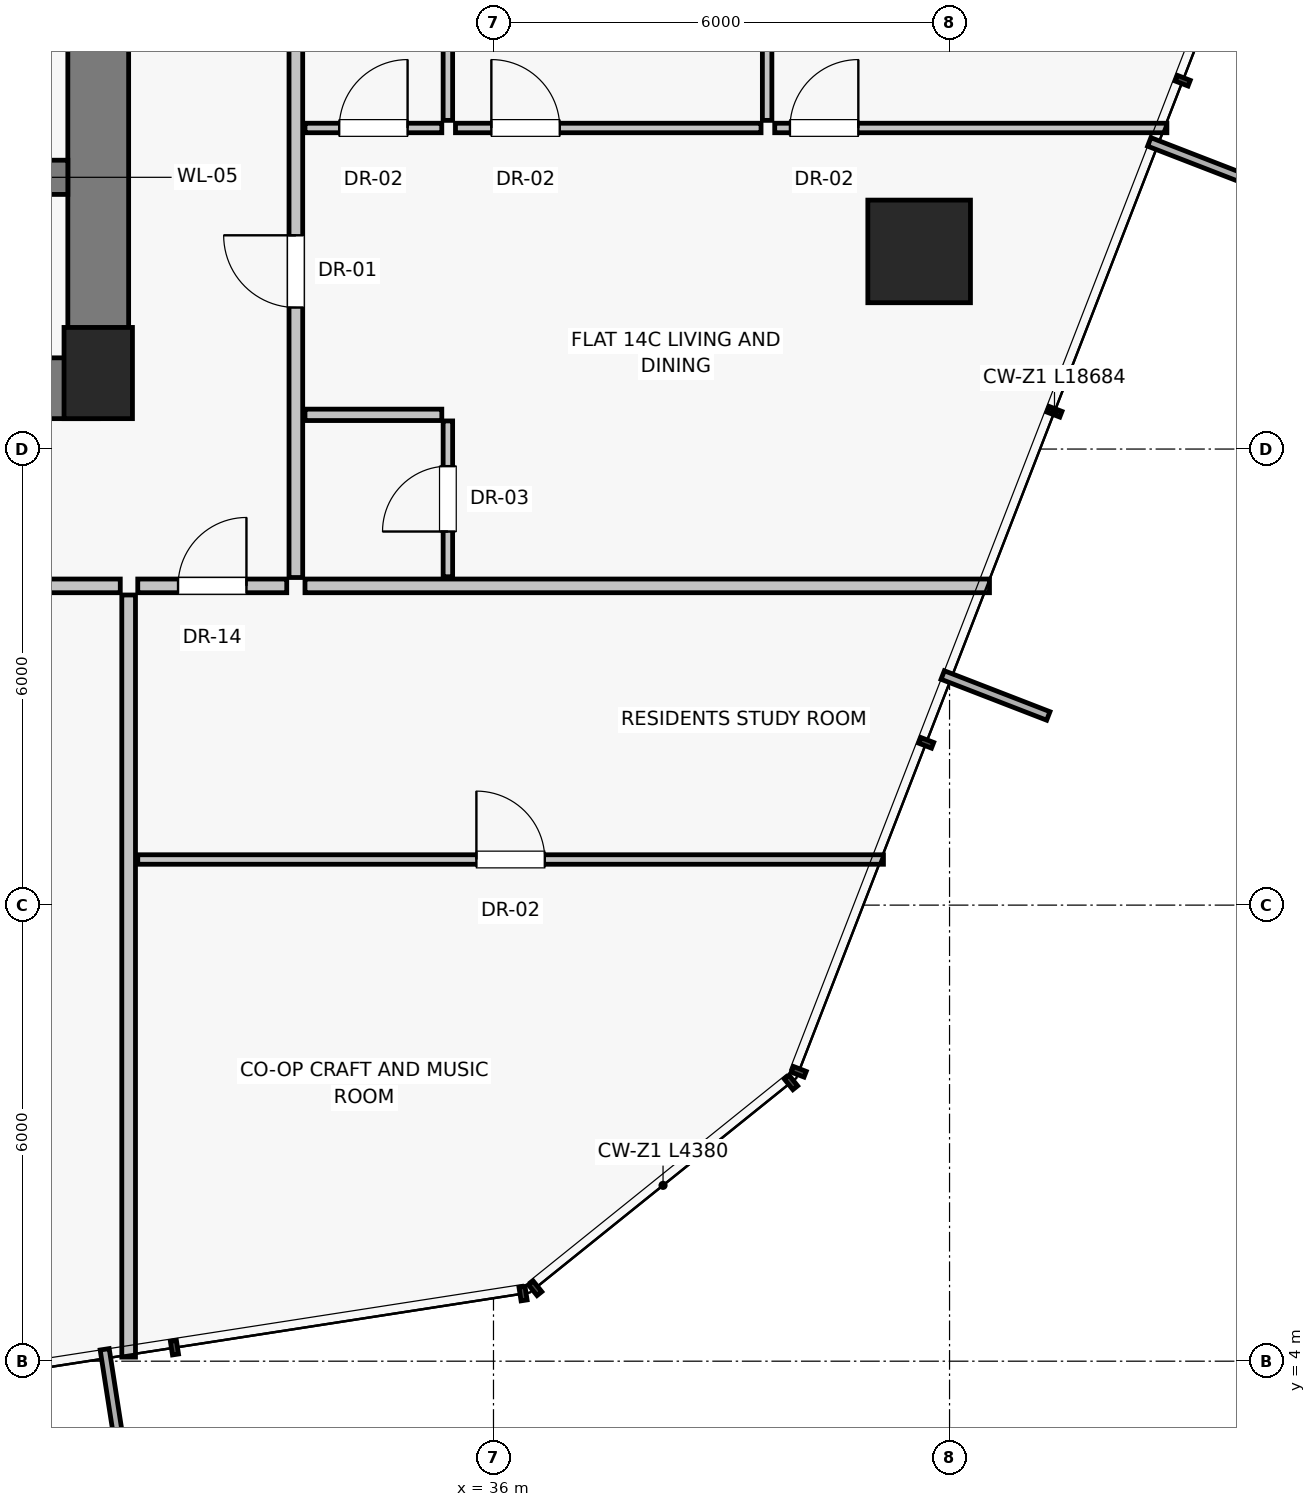
"""IFC4 building model, lengths in metres.
Left out: names, types, materials, properties, quantities, classifications, styles, units other than length and angle.
Written with IfcOpenShell. Run it as: python <this file> out.ifc"""

import sys

from ifc_helpers import new_model, si_unit, direction, frame, frame_2d, origin, origin_2d, place, context, subcontext, project, spatial, rectangle, extrude, source, transform, mapped, element, fill, save


model = new_model("IFC4")
c1 = context("Model", 3, precision=1e-05, world=origin(), true_north=direction((0.0, 1.0)))
c2 = subcontext(c1, "Body", "Model", "MODEL_VIEW")
j1 = project(units=[si_unit("LENGTHUNIT", "METRE"), si_unit("PLANEANGLEUNIT", "RADIAN")], contexts=[c1])
p1 = place(None, origin())
s1 = spatial("IfcSite", under=j1, at=p1, CompositionType="ELEMENT")
p2 = place(p1, origin())
s2 = spatial("IfcBuilding", under=s1, at=p2, CompositionType="ELEMENT")
p3 = place(p2, frame((0.0, 0.0, 53.3)))
s3 = spatial("IfcBuildingStorey", under=s2, at=p3, CompositionType="ELEMENT", Elevation=53.3)
p4 = place(p3, frame((30.8, 17.0, 0.0), z_axis=(0.0, 0.0, 1.0), x_axis=(1.0, 0.0, 0.0)))
e1 = element("IfcColumn", 1, at=p4, inside=s3, PredefinedType="PILASTER", context=c2, shape_type="SweptSolid", body=[
    extrude(rectangle(XDim=0.9, YDim=1.2, at=origin_2d()), origin(), (0.0, 0.0, 1.0), 3.25),
])
p5 = place(p3, frame((41.6, 18.6, 0.0), z_axis=(0.0, 0.0, 1.0), x_axis=(1.0, 0.0, 0.0)))
e2 = element("IfcColumn", 2, at=p5, inside=s3, PredefinedType="COLUMN", context=c2, shape_type="SweptSolid", body=[
    extrude(rectangle(XDim=1.35, YDim=1.35, at=origin_2d()), origin(), (0.0, 0.0, 1.0), 3.25),
])
p6 = place(p3, frame((30.8, 16.8, 0.0), z_axis=(0.0, 0.0, 1.0), x_axis=(0.0, 1.0, 0.0)))
e3 = element("IfcWall", 3, at=p6, inside=s3, PredefinedType="SHEAR", context=c2, shape_type="SweptSolid", body=[
    extrude(rectangle(XDim=14.2, YDim=0.8, at=frame_2d((7.1, 0.0))), origin(), (0.0, 0.0, 1.0), 2.97),
])
p7 = place(p3, frame((24.95, 16.8, 0.0), z_axis=(0.0, 0.0, 1.0), x_axis=(1.0, 0.0, 0.0)))
e4 = element("IfcWall", 4, at=p7, inside=s3, PredefinedType="SHEAR", context=c2, shape_type="SweptSolid", body=[
    extrude(rectangle(XDim=5.85, YDim=0.8, at=frame_2d((2.925, 0.0))), origin(), (0.0, 0.0, 1.0), 2.97),
])
p8 = place(p7, frame((2.15, 0.0, 0.0)))
e5 = element("IfcOpeningElement", 5, at=p8, cuts=e4, PredefinedType="OPENING", context=c2, shape_type="SweptSolid", body=[
    extrude(rectangle(XDim=1.2, YDim=2.03, at=frame_2d((0.6, 1.015))), frame((0.0, 0.41, 0.0), z_axis=(0.0, -1.0, 0.0), x_axis=(1.0, 0.0, 0.0)), (0.0, 0.0, 1.0), 0.82),
])
p9 = place(p3, frame((26.975, 19.575, 0.0), z_axis=(0.0, 0.0, 1.0), x_axis=(1.0, 0.0, 0.0)))
e6 = element("IfcWall", 6, at=p9, inside=s3, PredefinedType="SHEAR", context=c2, shape_type="SweptSolid", body=[
    extrude(rectangle(XDim=3.425, YDim=0.45, at=frame_2d((1.712, 0.0))), origin(), (0.0, 0.0, 1.0), 2.97),
])
p10 = place(p9, frame((1.05, 0.0, 0.0)))
e7 = element("IfcOpeningElement", 7, at=p10, cuts=e6, PredefinedType="OPENING", context=c2, shape_type="SweptSolid", body=[
    extrude(rectangle(XDim=1.1, YDim=2.03, at=frame_2d((0.55, 1.015))), frame((0.0, 0.235, 0.0), z_axis=(0.0, -1.0, 0.0), x_axis=(1.0, 0.0, 0.0)), (0.0, 0.0, 1.0), 0.47),
])
p11 = place(p3, frame((31.2, 14.08, 0.0), z_axis=(0.0, 0.0, 1.0), x_axis=(0.0, -1.0, 0.0)))
e8 = element("IfcWall", 8, at=p11, inside=s3, PredefinedType="PARTITIONING", context=c2, shape_type="SweptSolid", body=[
    extrude(rectangle(XDim=10.027, YDim=0.18, at=frame_2d((5.013, 0.0))), origin(), (0.0, 0.0, 1.0), 2.97),
])
p12 = place(p3, frame((24.368, 14.2, 0.0), z_axis=(0.0, 0.0, 1.0), x_axis=(1.0, 0.0, 0.0)))
e9 = element("IfcWall", 9, at=p12, inside=s3, PredefinedType="PARTITIONING", context=c2, shape_type="SweptSolid", body=[
    extrude(rectangle(XDim=6.722, YDim=0.18, at=frame_2d((3.361, 0.0))), origin(), (0.0, 0.0, 1.0), 2.97),
])
p13 = place(p12, frame((2.861, 0.0, 0.0)))
e10 = element("IfcOpeningElement", 10, at=p13, cuts=e9, PredefinedType="OPENING", context=c2, shape_type="SweptSolid", body=[
    extrude(rectangle(XDim=1.0, YDim=2.01, at=frame_2d((0.5, 1.005))), frame((0.0, 0.1, 0.0), z_axis=(0.0, -1.0, 0.0), x_axis=(1.0, 0.0, 0.0)), (0.0, 0.0, 1.0), 0.2),
])
p14 = place(p3, frame((33.52, 14.2, 0.0), z_axis=(0.0, 0.0, 1.0), x_axis=(1.0, 0.0, 0.0)))
e11 = element("IfcWall", 11, at=p14, inside=s3, PredefinedType="PARTITIONING", context=c2, shape_type="SweptSolid", body=[
    extrude(rectangle(XDim=9.005, YDim=0.18, at=frame_2d((4.503, 0.0))), origin(), (0.0, 0.0, 1.0), 2.97),
])
p15 = place(p3, frame((33.4, 14.31, 0.0), z_axis=(0.0, 0.0, 1.0), x_axis=(0.0, 1.0, 0.0)))
e12 = element("IfcWall", 12, at=p15, inside=s3, PredefinedType="PARTITIONING", context=c2, shape_type="SweptSolid", body=[
    extrude(rectangle(XDim=10.732, YDim=0.18, at=frame_2d((5.366, 0.0))), origin(), (0.0, 0.0, 1.0), 2.97),
])
p16 = place(p15, frame((3.552, 0.0, 0.0)))
e13 = element("IfcOpeningElement", 13, at=p16, cuts=e12, PredefinedType="OPENING", context=c2, shape_type="SweptSolid", body=[
    extrude(rectangle(XDim=0.95, YDim=2.02, at=frame_2d((0.475, 1.01))), frame((0.0, 0.1, 0.0), z_axis=(0.0, -1.0, 0.0), x_axis=(1.0, 0.0, 0.0)), (0.0, 0.0, 1.0), 0.2),
])
p17 = place(p3, frame((33.52, 16.45, 0.0), z_axis=(0.0, 0.0, 1.0), x_axis=(1.0, 0.0, 0.0)))
e14 = element("IfcWall", 14, at=p17, inside=s3, PredefinedType="PARTITIONING", context=c2, shape_type="SweptSolid", body=[
    extrude(rectangle(XDim=1.8, YDim=0.15, at=frame_2d((0.9, 0.0))), origin(), (0.0, 0.0, 1.0), 2.97),
])
p18 = place(p3, frame((35.4, 14.32, 0.0), z_axis=(0.0, 0.0, 1.0), x_axis=(0.0, 1.0, 0.0)))
e15 = element("IfcWall", 15, at=p18, inside=s3, PredefinedType="PARTITIONING", context=c2, shape_type="SweptSolid", body=[
    extrude(rectangle(XDim=2.05, YDim=0.125, at=frame_2d((1.025, 0.0))), origin(), (0.0, 0.0, 1.0), 2.97),
])
p19 = place(p18, frame((0.595, 0.0, 0.0)))
e16 = element("IfcOpeningElement", 16, at=p19, cuts=e15, PredefinedType="OPENING", context=c2, shape_type="SweptSolid", body=[
    extrude(rectangle(XDim=0.86, YDim=2.01, at=frame_2d((0.43, 1.005))), frame((0.0, 0.073, 0.0), z_axis=(0.0, -1.0, 0.0), x_axis=(1.0, 0.0, 0.0)), (0.0, 0.0, 1.0), 0.145),
])
p20 = place(p3, frame((33.52, 20.224, 0.0), z_axis=(0.0, 0.0, 1.0), x_axis=(1.0, 0.0, 0.0)))
e17 = element("IfcWall", 17, at=p20, inside=s3, PredefinedType="PARTITIONING", context=c2, shape_type="SweptSolid", body=[
    extrude(rectangle(XDim=1.8, YDim=0.125, at=frame_2d((0.9, 0.0))), origin(), (0.0, 0.0, 1.0), 2.97),
])
p21 = place(p20, frame((0.45, 0.0, 0.0)))
e18 = element("IfcOpeningElement", 18, at=p21, cuts=e17, PredefinedType="OPENING", context=c2, shape_type="SweptSolid", body=[
    extrude(rectangle(XDim=0.9, YDim=2.01, at=frame_2d((0.45, 1.005))), frame((0.0, 0.073, 0.0), z_axis=(0.0, -1.0, 0.0), x_axis=(1.0, 0.0, 0.0)), (0.0, 0.0, 1.0), 0.145),
])
for number, where, z_axis, x_axis in (
    (19, (35.4, 20.324, 0.0), (0.0, 0.0, 1.0), (0.0, 1.0, 0.0)),
    (20, (39.6, 20.324, 0.0), (0.0, 0.0, 1.0), (0.0, 1.0, 0.0)),
):
    element("IfcWall", number, at=place(p3, frame(where, z_axis=z_axis, x_axis=x_axis)), inside=s3, PredefinedType="PARTITIONING", context=c2, shape_type="SweptSolid", body=[
        extrude(rectangle(XDim=4.708, YDim=0.125, at=frame_2d((2.354, 0.0))), origin(), (0.0, 0.0, 1.0), 2.97),
    ])
p22 = place(p3, frame((35.5, 20.224, 0.0), z_axis=(0.0, 0.0, 1.0), x_axis=(1.0, 0.0, 0.0)))
e21 = element("IfcWall", 21, at=p22, inside=s3, PredefinedType="PARTITIONING", context=c2, shape_type="SweptSolid", body=[
    extrude(rectangle(XDim=4.02, YDim=0.125, at=frame_2d((2.01, 0.0))), origin(), (0.0, 0.0, 1.0), 2.97),
])
p23 = place(p22, frame((0.472, 0.0, 0.0)))
e22 = element("IfcOpeningElement", 22, at=p23, cuts=e21, PredefinedType="OPENING", context=c2, shape_type="SweptSolid", body=[
    extrude(rectangle(XDim=0.9, YDim=2.01, at=frame_2d((0.45, 1.005))), frame((0.0, 0.073, 0.0), z_axis=(0.0, -1.0, 0.0), x_axis=(1.0, 0.0, 0.0)), (0.0, 0.0, 1.0), 0.145),
])
p24 = place(p3, frame((39.7, 20.224, 0.0), z_axis=(0.0, 0.0, 1.0), x_axis=(1.0, 0.0, 0.0)))
e23 = element("IfcWall", 23, at=p24, inside=s3, PredefinedType="PARTITIONING", context=c2, shape_type="SweptSolid", body=[
    extrude(rectangle(XDim=5.159, YDim=0.125, at=frame_2d((2.58, 0.0))), origin(), (0.0, 0.0, 1.0), 2.97),
])
p25 = place(p24, frame((0.2, 0.0, 0.0)))
e24 = element("IfcOpeningElement", 24, at=p25, cuts=e23, PredefinedType="OPENING", context=c2, shape_type="SweptSolid", body=[
    extrude(rectangle(XDim=0.9, YDim=2.01, at=frame_2d((0.45, 1.005))), frame((0.0, 0.073, 0.0), z_axis=(0.0, -1.0, 0.0), x_axis=(1.0, 0.0, 0.0)), (0.0, 0.0, 1.0), 0.145),
])
p26 = place(p3, frame((31.32, 14.2, 0.0), z_axis=(0.0, 0.0, 1.0), x_axis=(1.0, 0.0, 0.0)))
e25 = element("IfcWall", 25, at=p26, inside=s3, PredefinedType="PARTITIONING", context=c2, shape_type="SweptSolid", body=[
    extrude(rectangle(XDim=1.96, YDim=0.18, at=frame_2d((0.98, 0.0))), origin(), (0.0, 0.0, 1.0), 2.97),
])
p27 = place(p26, frame((0.53, 0.0, 0.0)))
e26 = element("IfcOpeningElement", 26, at=p27, cuts=e25, PredefinedType="OPENING", context=c2, shape_type="SweptSolid", body=[
    extrude(rectangle(XDim=0.9, YDim=2.01, at=frame_2d((0.45, 1.005))), frame((0.0, 0.1, 0.0), z_axis=(0.0, -1.0, 0.0), x_axis=(1.0, 0.0, 0.0)), (0.0, 0.0, 1.0), 0.2),
])
p28 = place(p3, frame((31.32, 10.6, 0.0), z_axis=(0.0, 0.0, 1.0), x_axis=(1.0, 0.0, 0.0)))
e27 = element("IfcWall", 27, at=p28, inside=s3, PredefinedType="PARTITIONING", context=c2, shape_type="SweptSolid", body=[
    extrude(rectangle(XDim=9.81, YDim=0.125, at=frame_2d((4.905, 0.0))), origin(), (0.0, 0.0, 1.0), 2.97),
])
p29 = place(p28, frame((4.455, 0.0, 0.0)))
e28 = element("IfcOpeningElement", 28, at=p29, cuts=e27, PredefinedType="OPENING", context=c2, shape_type="SweptSolid", body=[
    extrude(rectangle(XDim=0.9, YDim=2.01, at=frame_2d((0.45, 1.005))), frame((0.0, 0.073, 0.0), z_axis=(0.0, -1.0, 0.0), x_axis=(1.0, 0.0, 0.0)), (0.0, 0.0, 1.0), 0.145),
])
m1 = source(origin(), c2, "Body", "SweptSolid", [
    extrude(rectangle(XDim=0.95, YDim=2.02, at=frame_2d((0.475, 1.01))), frame((0.0, 0.025, 0.0), z_axis=(0.0, -1.0, 0.0), x_axis=(1.0, 0.0, 0.0)), (0.0, 0.0, 1.0), 0.05),
])
p30 = place(p16, origin())
e29 = element("IfcDoor", 29, at=p30, inside=s3, OperationType="SINGLE_SWING_RIGHT", PredefinedType="DOOR", context=c2, shape_type="MappedRepresentation", body=[
    mapped(m1, transform((0.0, 0.0, 0.0), scale=1.0)),
])
fill(e13, e29)
m2 = source(origin(), c2, "Body", "SweptSolid", [
    extrude(rectangle(XDim=0.86, YDim=2.01, at=frame_2d((0.43, 1.005))), frame((0.0, 0.025, 0.0), z_axis=(0.0, -1.0, 0.0), x_axis=(1.0, 0.0, 0.0)), (0.0, 0.0, 1.0), 0.05),
])
p31 = place(p19, origin())
e30 = element("IfcDoor", 30, at=p31, inside=s3, OperationType="SINGLE_SWING_LEFT", PredefinedType="DOOR", context=c2, shape_type="MappedRepresentation", body=[
    mapped(m2, transform((0.0, 0.0, 0.0), scale=1.0)),
])
fill(e16, e30)
m3 = source(origin(), c2, "Body", "SweptSolid", [
    extrude(rectangle(XDim=0.9, YDim=2.01, at=frame_2d((0.45, 1.005))), frame((0.0, 0.025, 0.0), z_axis=(0.0, -1.0, 0.0), x_axis=(1.0, 0.0, 0.0)), (0.0, 0.0, 1.0), 0.05),
])
p32 = place(p21, origin())
e31 = element("IfcDoor", 31, at=p32, inside=s3, OperationType="SINGLE_SWING_RIGHT", PredefinedType="DOOR", context=c2, shape_type="MappedRepresentation", body=[
    mapped(m3, transform((0.0, 0.0, 0.0), scale=1.0)),
])
fill(e18, e31)
p33 = place(p23, origin())
e32 = element("IfcDoor", 32, at=p33, inside=s3, OperationType="SINGLE_SWING_LEFT", PredefinedType="DOOR", context=c2, shape_type="MappedRepresentation", body=[
    mapped(m3, transform((0.0, 0.0, 0.0), scale=1.0)),
])
fill(e22, e32)
p34 = place(p25, origin())
e33 = element("IfcDoor", 33, at=p34, inside=s3, OperationType="SINGLE_SWING_RIGHT", PredefinedType="DOOR", context=c2, shape_type="MappedRepresentation", body=[
    mapped(m3, transform((0.0, 0.0, 0.0), scale=1.0)),
])
fill(e24, e33)
p35 = place(p27, origin())
e34 = element("IfcDoor", 34, at=p35, inside=s3, OperationType="SINGLE_SWING_RIGHT", PredefinedType="DOOR", context=c2, shape_type="MappedRepresentation", body=[
    mapped(m3, transform((0.0, 0.0, 0.0), scale=1.0)),
])
fill(e26, e34)
p36 = place(p29, origin())
e35 = element("IfcDoor", 35, at=p36, inside=s3, OperationType="SINGLE_SWING_LEFT", PredefinedType="DOOR", context=c2, shape_type="MappedRepresentation", body=[
    mapped(m3, transform((0.0, 0.0, 0.0), scale=1.0)),
])
fill(e28, e35)
save(model, sys.argv[1])
